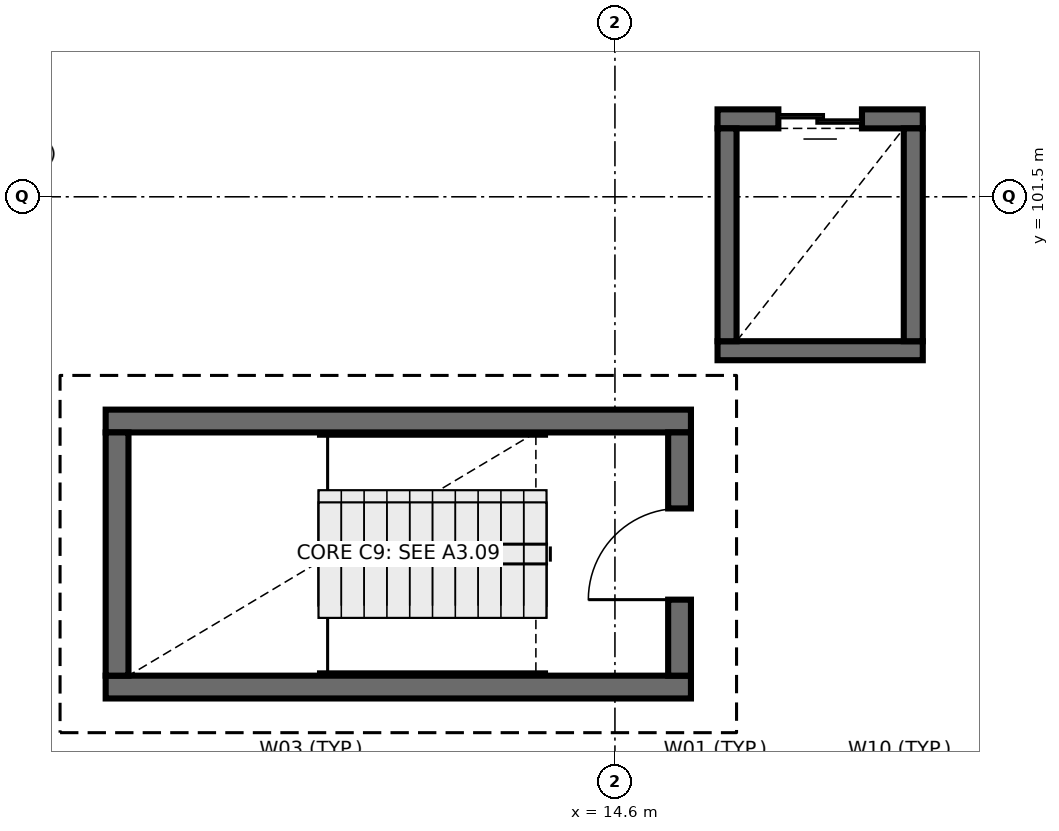
"""IFC4 building model, lengths in metres.
Left out: names, types, materials, properties, quantities, classifications, styles, units other than length and angle.
Written with IfcOpenShell. Run it as: python <this file> out.ifc"""

import sys

from ifc_helpers import new_model, si_unit, direction, frame, frame_2d, origin, place, context, subcontext, project, spatial, rectangle, extrude, element, fill, save


model = new_model("IFC4")
c1 = context("Model", 3, precision=1e-05, world=origin(), true_north=direction((0.0, 1.0)))
c2 = subcontext(c1, "Body", "Model", "MODEL_VIEW")
j1 = project(units=[si_unit("LENGTHUNIT", "METRE"), si_unit("PLANEANGLEUNIT", "RADIAN")], contexts=[c1])
p1 = place(None, origin())
s1 = spatial("IfcSite", under=j1, at=p1, CompositionType="ELEMENT")
p2 = place(p1, origin())
s2 = spatial("IfcBuilding", under=s1, at=p2, CompositionType="ELEMENT")
p3 = place(p2, frame((0.0, 0.0, 22.8)))
s3 = spatial("IfcBuildingStorey", under=s2, at=p3, CompositionType="ELEMENT", Elevation=22.8)
for number, where, z_axis, x_axis in (
    (1, (7.9, 95.05, 0.0), (0.0, 0.0, 1.0), (1.0, 0.0, 0.0)),
    (2, (15.6, 98.55, 0.0), (0.0, 0.0, 1.0), (-1.0, 0.0, 0.0)),
):
    element("IfcWall", number, at=place(p3, frame(where, z_axis=z_axis, x_axis=x_axis)), inside=s3, PredefinedType="SHEAR", context=c2, shape_type="SweptSolid", body=[
        extrude(rectangle(XDim=7.7, YDim=0.3, at=frame_2d((3.85, 0.0))), origin(), (0.0, 0.0, 1.0), 3.9),
    ])
p4 = place(p3, frame((8.05, 98.4, 0.0), z_axis=(0.0, 0.0, 1.0), x_axis=(0.0, -1.0, 0.0)))
e3 = element("IfcWall", 3, at=p4, inside=s3, PredefinedType="SHEAR", context=c2, shape_type="SweptSolid", body=[
    extrude(rectangle(XDim=3.2, YDim=0.3, at=frame_2d((1.6, 0.0))), origin(), (0.0, 0.0, 1.0), 3.9),
])
p5 = place(p3, frame((15.45, 95.2, 0.0), z_axis=(0.0, 0.0, 1.0), x_axis=(0.0, 1.0, 0.0)))
e4 = element("IfcWall", 4, at=p5, inside=s3, PredefinedType="SHEAR", context=c2, shape_type="SweptSolid", body=[
    extrude(rectangle(XDim=3.2, YDim=0.3, at=frame_2d((1.6, 0.0))), origin(), (0.0, 0.0, 1.0), 3.9),
])
p6 = place(p5, frame((1.0, 0.0, 0.0)))
e5 = element("IfcOpeningElement", 5, at=p6, cuts=e4, PredefinedType="OPENING", context=c2, shape_type="SweptSolid", body=[
    extrude(rectangle(XDim=1.2, YDim=2.15, at=frame_2d((0.6, 1.075))), frame((0.0, 0.16, 0.0), z_axis=(0.0, -1.0, 0.0), x_axis=(1.0, 0.0, 0.0)), (0.0, 0.0, 1.0), 0.32),
])
p7 = place(p3, frame((15.95, 99.475, 0.0), z_axis=(0.0, 0.0, 1.0), x_axis=(1.0, 0.0, 0.0)))
e6 = element("IfcWall", 6, at=p7, inside=s3, PredefinedType="SHEAR", context=c2, shape_type="SweptSolid", body=[
    extrude(rectangle(XDim=2.7, YDim=0.25, at=frame_2d((1.35, 0.0))), origin(), (0.0, 0.0, 1.0), 3.9),
])
p8 = place(p3, frame((18.65, 102.525, 0.0), z_axis=(0.0, 0.0, 1.0), x_axis=(-1.0, 0.0, 0.0)))
e7 = element("IfcWall", 7, at=p8, inside=s3, PredefinedType="SHEAR", context=c2, shape_type="SweptSolid", body=[
    extrude(rectangle(XDim=2.7, YDim=0.25, at=frame_2d((1.35, 0.0))), origin(), (0.0, 0.0, 1.0), 3.9),
])
p9 = place(p8, frame((0.8, 0.0, 0.0)))
e8 = element("IfcOpeningElement", 8, at=p9, cuts=e7, PredefinedType="OPENING", context=c2, shape_type="SweptSolid", body=[
    extrude(rectangle(XDim=1.1, YDim=2.15, at=frame_2d((0.55, 1.075))), frame((0.0, 0.135, 0.0), z_axis=(0.0, -1.0, 0.0), x_axis=(1.0, 0.0, 0.0)), (0.0, 0.0, 1.0), 0.27),
])
for number, where, z_axis, x_axis in (
    (9, (16.075, 102.4, 0.0), (0.0, 0.0, 1.0), (0.0, -1.0, 0.0)),
    (10, (18.525, 99.6, 0.0), (0.0, 0.0, 1.0), (0.0, 1.0, 0.0)),
):
    element("IfcWall", number, at=place(p3, frame(where, z_axis=z_axis, x_axis=x_axis)), inside=s3, PredefinedType="SHEAR", context=c2, shape_type="SweptSolid", body=[
        extrude(rectangle(XDim=2.8, YDim=0.25, at=frame_2d((1.4, 0.0))), origin(), (0.0, 0.0, 1.0), 3.9),
    ])
p10 = place(p6, origin())
e11 = element("IfcDoor", 11, at=p10, inside=s3, OperationType="SINGLE_SWING_LEFT", PredefinedType="DOOR", context=c2, shape_type="SweptSolid", body=[
    extrude(rectangle(XDim=1.2, YDim=2.15, at=frame_2d((0.6, 1.075))), frame((0.0, 0.025, 0.0), z_axis=(0.0, -1.0, 0.0), x_axis=(1.0, 0.0, 0.0)), (0.0, 0.0, 1.0), 0.05),
])
fill(e5, e11)
p11 = place(p9, origin())
e12 = element("IfcDoor", 12, at=p11, inside=s3, OperationType="DOUBLE_DOOR_SLIDING", PredefinedType="DOOR", context=c2, shape_type="SweptSolid", body=[
    extrude(rectangle(XDim=1.1, YDim=2.15, at=frame_2d((0.55, 1.075))), frame((0.0, 0.025, 0.0), z_axis=(0.0, -1.0, 0.0), x_axis=(1.0, 0.0, 0.0)), (0.0, 0.0, 1.0), 0.05),
])
fill(e8, e12)
save(model, sys.argv[1])
